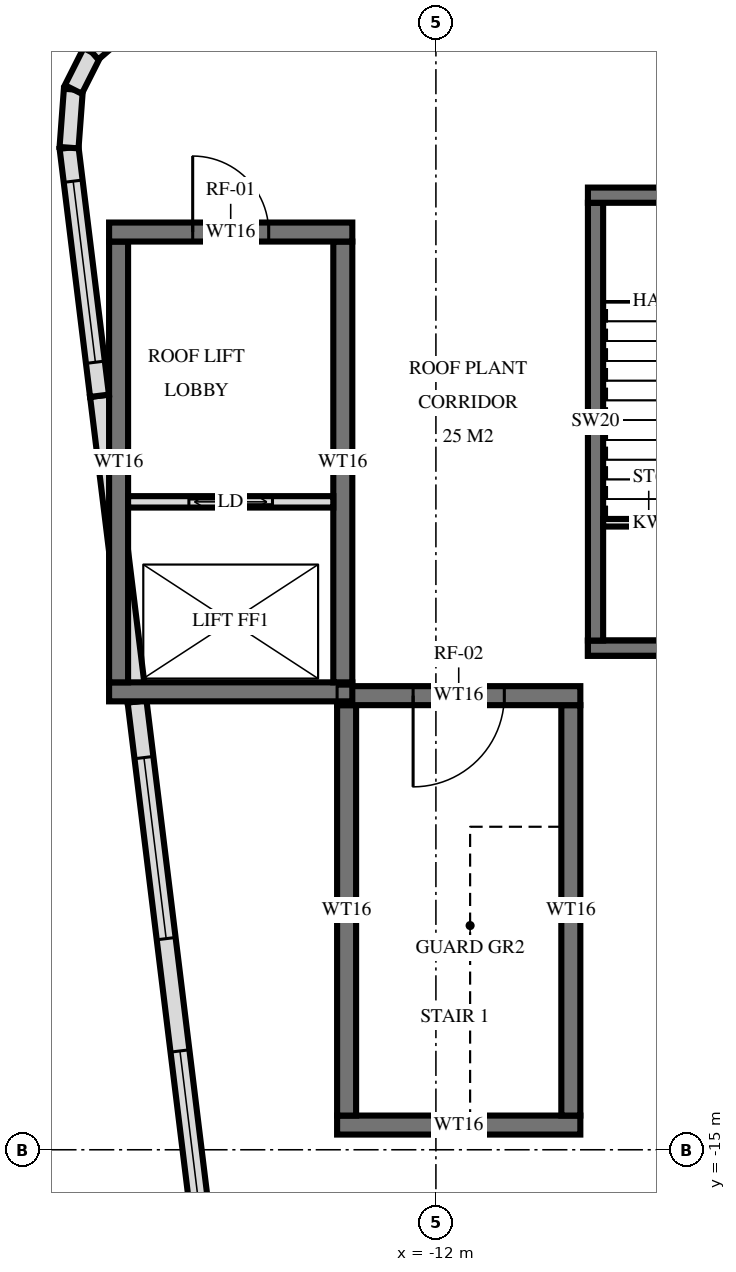
"""IFC4 building model, lengths in metres.
Left out: names, types, materials, properties, quantities, classifications, styles, units other than length and angle.
Written with IfcOpenShell. Run it as: python <this file> out.ifc"""

import sys

from ifc_helpers import new_model, si_unit, direction, frame, frame_2d, origin, place, context, subcontext, project, spatial, rectangle, extrude, element, fill, save


model = new_model("IFC4")
c1 = context("Model", 3, precision=1e-05, world=origin(), true_north=direction((0.0, 1.0)))
c2 = subcontext(c1, "Body", "Model", "MODEL_VIEW")
j1 = project(units=[si_unit("LENGTHUNIT", "METRE"), si_unit("PLANEANGLEUNIT", "RADIAN")], contexts=[c1])
p1 = place(None, origin())
s1 = spatial("IfcSite", under=j1, at=p1, CompositionType="ELEMENT")
p2 = place(p1, origin())
s2 = spatial("IfcBuilding", under=s1, at=p2, CompositionType="ELEMENT")
p3 = place(p2, frame((0.0, 0.0, 363.4)))
s3 = spatial("IfcBuildingStorey", under=s2, at=p3, CompositionType="ELEMENT", Elevation=363.4)
p4 = place(p3, frame((-13.3, -9.025, 0.0), z_axis=(0.0, 0.0, 1.0), x_axis=(1.0, 0.0, 0.0)))
e1 = element("IfcWall", 1, at=p4, inside=s3, PredefinedType="SHEAR", context=c2, shape_type="SweptSolid", body=[
    extrude(rectangle(XDim=3.2, YDim=0.25, at=frame_2d((1.6, 0.0))), origin(), (0.0, 0.0, 1.0), 3.0),
])
p5 = place(p4, frame((1.0, 0.0, 0.0)))
e2 = element("IfcOpeningElement", 2, at=p5, cuts=e1, PredefinedType="OPENING", context=c2, shape_type="SweptSolid", body=[
    extrude(rectangle(XDim=1.2, YDim=2.1, at=frame_2d((0.6, 1.05))), frame((0.0, 0.135, 0.0), z_axis=(0.0, -1.0, 0.0), x_axis=(1.0, 0.0, 0.0)), (0.0, 0.0, 1.0), 0.27),
])
p6 = place(p3, frame((-13.3, -14.675, 0.0), z_axis=(0.0, 0.0, 1.0), x_axis=(1.0, 0.0, 0.0)))
e3 = element("IfcWall", 3, at=p6, inside=s3, PredefinedType="SHEAR", context=c2, shape_type="SweptSolid", body=[
    extrude(rectangle(XDim=3.2, YDim=0.25, at=frame_2d((1.6, 0.0))), origin(), (0.0, 0.0, 1.0), 3.0),
])
for number, where, z_axis, x_axis in (
    (4, (-13.175, -14.55, 0.0), (0.0, 0.0, 1.0), (0.0, 1.0, 0.0)),
    (5, (-10.225, -14.55, 0.0), (0.0, 0.0, 1.0), (0.0, 1.0, 0.0)),
):
    element("IfcWall", number, at=place(p3, frame(where, z_axis=z_axis, x_axis=x_axis)), inside=s3, PredefinedType="SHEAR", context=c2, shape_type="SweptSolid", body=[
        extrude(rectangle(XDim=5.4, YDim=0.25, at=frame_2d((2.7, 0.0))), origin(), (0.0, 0.0, 1.0), 3.0),
    ])
p7 = place(p3, frame((-16.3, -2.925, 0.0), z_axis=(0.0, 0.0, 1.0), x_axis=(1.0, 0.0, 0.0)))
e6 = element("IfcWall", 6, at=p7, inside=s3, PredefinedType="SHEAR", context=c2, shape_type="SweptSolid", body=[
    extrude(rectangle(XDim=3.2, YDim=0.25, at=frame_2d((1.6, 0.0))), origin(), (0.0, 0.0, 1.0), 5.0),
])
p8 = place(p7, frame((1.1, 0.0, 0.0)))
e7 = element("IfcOpeningElement", 7, at=p8, cuts=e6, PredefinedType="OPENING", context=c2, shape_type="SweptSolid", body=[
    extrude(rectangle(XDim=1.0, YDim=2.1, at=frame_2d((0.5, 1.05))), frame((0.0, 0.135, 0.0), z_axis=(0.0, -1.0, 0.0), x_axis=(1.0, 0.0, 0.0)), (0.0, 0.0, 1.0), 0.27),
])
p9 = place(p3, frame((-16.3, -8.975, 0.0), z_axis=(0.0, 0.0, 1.0), x_axis=(1.0, 0.0, 0.0)))
e8 = element("IfcWall", 8, at=p9, inside=s3, PredefinedType="SHEAR", context=c2, shape_type="SweptSolid", body=[
    extrude(rectangle(XDim=3.2, YDim=0.25, at=frame_2d((1.6, 0.0))), origin(), (0.0, 0.0, 1.0), 5.0),
])
for number, where, z_axis, x_axis in (
    (9, (-16.175, -8.85, 0.0), (0.0, 0.0, 1.0), (0.0, 1.0, 0.0)),
    (10, (-13.225, -8.85, 0.0), (0.0, 0.0, 1.0), (0.0, 1.0, 0.0)),
):
    element("IfcWall", number, at=place(p3, frame(where, z_axis=z_axis, x_axis=x_axis)), inside=s3, PredefinedType="SHEAR", context=c2, shape_type="SweptSolid", body=[
        extrude(rectangle(XDim=5.8, YDim=0.25, at=frame_2d((2.9, 0.0))), origin(), (0.0, 0.0, 1.0), 5.0),
    ])
p10 = place(p3, frame((15.38, -14.767, 0.0), z_axis=(0.0, 0.0, 1.0), x_axis=(-0.992546810088, -0.121863980664, 0.0)))
e11 = element("IfcWall", 11, at=p10, inside=s3, PredefinedType="SOLIDWALL", context=c2, shape_type="SweptSolid", body=[
    extrude(rectangle(XDim=28.727, YDim=0.25, at=frame_2d((14.363, 0.0))), origin(), (0.0, 0.0, 1.0), 12.0),
])
p11 = place(p10, frame((0.396, 0.0, 1.0)))
e12 = element("IfcOpeningElement", 12, at=p11, cuts=e11, PredefinedType="OPENING", context=c2, shape_type="SweptSolid", body=[
    extrude(rectangle(XDim=2.4, YDim=9.0, at=frame_2d((1.2, 4.5))), frame((0.0, 0.135, 0.0), z_axis=(0.0, -1.0, 0.0), x_axis=(1.0, 0.0, 0.0)), (0.0, 0.0, 1.0), 0.27),
])
p12 = place(p10, frame((3.588, 0.0, 1.0)))
e13 = element("IfcOpeningElement", 13, at=p12, cuts=e11, PredefinedType="OPENING", context=c2, shape_type="SweptSolid", body=[
    extrude(rectangle(XDim=2.4, YDim=9.0, at=frame_2d((1.2, 4.5))), frame((0.0, 0.135, 0.0), z_axis=(0.0, -1.0, 0.0), x_axis=(1.0, 0.0, 0.0)), (0.0, 0.0, 1.0), 0.27),
])
p13 = place(p10, frame((6.78, 0.0, 1.0)))
e14 = element("IfcOpeningElement", 14, at=p13, cuts=e11, PredefinedType="OPENING", context=c2, shape_type="SweptSolid", body=[
    extrude(rectangle(XDim=2.4, YDim=9.0, at=frame_2d((1.2, 4.5))), frame((0.0, 0.135, 0.0), z_axis=(0.0, -1.0, 0.0), x_axis=(1.0, 0.0, 0.0)), (0.0, 0.0, 1.0), 0.27),
])
p14 = place(p10, frame((9.971, 0.0, 1.0)))
e15 = element("IfcOpeningElement", 15, at=p14, cuts=e11, PredefinedType="OPENING", context=c2, shape_type="SweptSolid", body=[
    extrude(rectangle(XDim=2.4, YDim=9.0, at=frame_2d((1.2, 4.5))), frame((0.0, 0.135, 0.0), z_axis=(0.0, -1.0, 0.0), x_axis=(1.0, 0.0, 0.0)), (0.0, 0.0, 1.0), 0.27),
])
p15 = place(p10, frame((13.163, 0.0, 1.0)))
e16 = element("IfcOpeningElement", 16, at=p15, cuts=e11, PredefinedType="OPENING", context=c2, shape_type="SweptSolid", body=[
    extrude(rectangle(XDim=2.4, YDim=9.0, at=frame_2d((1.2, 4.5))), frame((0.0, 0.135, 0.0), z_axis=(0.0, -1.0, 0.0), x_axis=(1.0, 0.0, 0.0)), (0.0, 0.0, 1.0), 0.27),
])
p16 = place(p10, frame((16.355, 0.0, 1.0)))
e17 = element("IfcOpeningElement", 17, at=p16, cuts=e11, PredefinedType="OPENING", context=c2, shape_type="SweptSolid", body=[
    extrude(rectangle(XDim=2.4, YDim=9.0, at=frame_2d((1.2, 4.5))), frame((0.0, 0.135, 0.0), z_axis=(0.0, -1.0, 0.0), x_axis=(1.0, 0.0, 0.0)), (0.0, 0.0, 1.0), 0.27),
])
p17 = place(p10, frame((19.547, 0.0, 1.0)))
e18 = element("IfcOpeningElement", 18, at=p17, cuts=e11, PredefinedType="OPENING", context=c2, shape_type="SweptSolid", body=[
    extrude(rectangle(XDim=2.4, YDim=9.0, at=frame_2d((1.2, 4.5))), frame((0.0, 0.135, 0.0), z_axis=(0.0, -1.0, 0.0), x_axis=(1.0, 0.0, 0.0)), (0.0, 0.0, 1.0), 0.27),
])
p18 = place(p10, frame((22.739, 0.0, 1.0)))
e19 = element("IfcOpeningElement", 19, at=p18, cuts=e11, PredefinedType="OPENING", context=c2, shape_type="SweptSolid", body=[
    extrude(rectangle(XDim=2.4, YDim=9.0, at=frame_2d((1.2, 4.5))), frame((0.0, 0.135, 0.0), z_axis=(0.0, -1.0, 0.0), x_axis=(1.0, 0.0, 0.0)), (0.0, 0.0, 1.0), 0.27),
])
p19 = place(p10, frame((25.931, 0.0, 1.0)))
e20 = element("IfcOpeningElement", 20, at=p19, cuts=e11, PredefinedType="OPENING", context=c2, shape_type="SweptSolid", body=[
    extrude(rectangle(XDim=2.4, YDim=9.0, at=frame_2d((1.2, 4.5))), frame((0.0, 0.135, 0.0), z_axis=(0.0, -1.0, 0.0), x_axis=(1.0, 0.0, 0.0)), (0.0, 0.0, 1.0), 0.27),
])
p20 = place(p3, frame((-14.984, -16.821, 0.0), z_axis=(0.0, 0.0, 1.0), x_axis=(-0.121855495288, 0.992547851878, 0.0)))
e21 = element("IfcWall", 21, at=p20, inside=s3, PredefinedType="SOLIDWALL", context=c2, shape_type="SweptSolid", body=[
    extrude(rectangle(XDim=7.778, YDim=0.25, at=frame_2d((3.889, 0.0))), origin(), (0.0, 0.0, 1.0), 12.0),
])
p21 = place(p20, frame((0.744, 0.0, 1.0)))
e22 = element("IfcOpeningElement", 22, at=p21, cuts=e21, PredefinedType="OPENING", context=c2, shape_type="SweptSolid", body=[
    extrude(rectangle(XDim=2.4, YDim=9.0, at=frame_2d((1.2, 4.5))), frame((0.0, 0.135, 0.0), z_axis=(0.0, -1.0, 0.0), x_axis=(1.0, 0.0, 0.0)), (0.0, 0.0, 1.0), 0.27),
])
p22 = place(p20, frame((4.633, 0.0, 1.0)))
e23 = element("IfcOpeningElement", 23, at=p22, cuts=e21, PredefinedType="OPENING", context=c2, shape_type="SweptSolid", body=[
    extrude(rectangle(XDim=2.4, YDim=9.0, at=frame_2d((1.2, 4.5))), frame((0.0, 0.135, 0.0), z_axis=(0.0, -1.0, 0.0), x_axis=(1.0, 0.0, 0.0)), (0.0, 0.0, 1.0), 0.27),
])
p23 = place(p3, frame((-16.426, -5.079, 0.0), z_axis=(0.0, 0.0, 1.0), x_axis=(-0.121896433705, 0.992542824995, 0.0)))
e24 = element("IfcWall", 24, at=p23, inside=s3, PredefinedType="SOLIDWALL", context=c2, shape_type="SweptSolid", body=[
    extrude(rectangle(XDim=3.289, YDim=0.25, at=frame_2d((1.644, 0.0))), origin(), (0.0, 0.0, 1.0), 12.0),
])
p24 = place(p23, frame((0.444, 0.0, 1.0)))
e25 = element("IfcOpeningElement", 25, at=p24, cuts=e24, PredefinedType="OPENING", context=c2, shape_type="SweptSolid", body=[
    extrude(rectangle(XDim=2.4, YDim=9.0, at=frame_2d((1.2, 4.5))), frame((0.0, 0.135, 0.0), z_axis=(0.0, -1.0, 0.0), x_axis=(1.0, 0.0, 0.0)), (0.0, 0.0, 1.0), 0.27),
])
p25 = place(p3, frame((-16.827, -1.815, 0.0), z_axis=(0.0, 0.0, 1.0), x_axis=(0.074070751166, 0.997252988876, 0.0)))
e26 = element("IfcWall", 26, at=p25, inside=s3, PredefinedType="SOLIDWALL", context=c2, shape_type="SweptSolid", body=[
    extrude(rectangle(XDim=0.768, YDim=0.25, at=frame_2d((0.384, 0.0))), origin(), (0.0, 0.0, 1.0), 12.0),
])
p26 = place(p3, frame((-16.77, -1.049, 0.0), z_axis=(0.0, 0.0, 1.0), x_axis=(0.450424839649, 0.892814350146, 0.0)))
e27 = element("IfcWall", 27, at=p26, inside=s3, PredefinedType="SOLIDWALL", context=c2, shape_type="SweptSolid", body=[
    extrude(rectangle(XDim=0.547, YDim=0.25, at=frame_2d((0.273, 0.0))), origin(), (0.0, 0.0, 1.0), 12.0),
])
p27 = place(p3, frame((-16.524, -0.561, 0.0), z_axis=(0.0, 0.0, 1.0), x_axis=(0.757394739228, 0.652957279605, 0.0)))
e28 = element("IfcWall", 28, at=p27, inside=s3, PredefinedType="SOLIDWALL", context=c2, shape_type="SweptSolid", body=[
    extrude(rectangle(XDim=0.547, YDim=0.25, at=frame_2d((0.273, 0.0))), origin(), (0.0, 0.0, 1.0), 12.0),
])
p28 = place(p3, frame((-15.932, -9.101, 5.25), z_axis=(0.0, 0.0, 1.0), x_axis=(-0.121884012435, 0.992544350401, 0.0)))
e29 = element("IfcWall", 29, at=p28, inside=s3, PredefinedType="SOLIDWALL", context=c2, shape_type="SweptSolid", body=[
    extrude(rectangle(XDim=4.052, YDim=0.25, at=frame_2d((2.026, 0.0))), origin(), (0.0, 0.0, 1.0), 6.75),
])
p29 = place(p3, frame((-17.019, -17.277, 0.0), z_axis=(0.0, 0.0, 1.0), x_axis=(-0.12187092039, 0.992545958011, 0.0)))
e30 = element("IfcWall", 30, at=p29, inside=s3, PredefinedType="PARAPET", context=c2, shape_type="SweptSolid", body=[
    extrude(rectangle(XDim=15.527, YDim=0.25, at=frame_2d((7.764, 0.0))), origin(), (0.0, 0.0, 1.0), 1.1),
])
p30 = place(p3, frame((-16.05, -6.475, 0.0), z_axis=(0.0, 0.0, 1.0), x_axis=(1.0, 0.0, 0.0)))
e31 = element("IfcWall", 31, at=p30, inside=s3, PredefinedType="PARTITIONING", context=c2, shape_type="SweptSolid", body=[
    extrude(rectangle(XDim=2.7, YDim=0.15, at=frame_2d((1.35, 0.0))), origin(), (0.0, 0.0, 1.0), 5.0),
])
p31 = place(p30, frame((0.8, 0.0, 0.0)))
e32 = element("IfcOpeningElement", 32, at=p31, cuts=e31, PredefinedType="OPENING", context=c2, shape_type="SweptSolid", body=[
    extrude(rectangle(XDim=1.1, YDim=2.1, at=frame_2d((0.55, 1.05))), frame((0.0, 0.085, 0.0), z_axis=(0.0, -1.0, 0.0), x_axis=(1.0, 0.0, 0.0)), (0.0, 0.0, 1.0), 0.17),
])
p32 = place(p3, frame((-9.9, -8.3, 0.0), z_axis=(0.0, 0.0, 1.0), x_axis=(0.0, 1.0, 0.0)))
e33 = element("IfcWall", 33, at=p32, inside=s3, PredefinedType="SHEAR", context=c2, shape_type="SweptSolid", body=[
    extrude(rectangle(XDim=5.76, YDim=0.2, at=frame_2d((2.88, 0.0))), origin(), (0.0, 0.0, 1.0), 14.9),
])
p33 = place(p3, frame((-10.0, -2.44, 0.0), z_axis=(0.0, 0.0, 1.0), x_axis=(1.0, 0.0, 0.0)))
e34 = element("IfcWall", 34, at=p33, inside=s3, PredefinedType="SHEAR", context=c2, shape_type="SweptSolid", body=[
    extrude(rectangle(XDim=3.05, YDim=0.2, at=frame_2d((1.525, 0.0))), origin(), (0.0, 0.0, 1.0), 14.9),
])
p34 = place(p3, frame((-10.0, -8.4, 0.0), z_axis=(0.0, 0.0, 1.0), x_axis=(1.0, 0.0, 0.0)))
e35 = element("IfcWall", 35, at=p34, inside=s3, PredefinedType="SHEAR", context=c2, shape_type="SweptSolid", body=[
    extrude(rectangle(XDim=3.05, YDim=0.2, at=frame_2d((1.525, 0.0))), origin(), (0.0, 0.0, 1.0), 12.2),
])
p35 = place(p34, frame((0.925, 0.0, 0.0)))
e36 = element("IfcOpeningElement", 36, at=p35, cuts=e35, PredefinedType="OPENING", context=c2, shape_type="SweptSolid", body=[
    extrude(rectangle(XDim=1.2, YDim=2.1, at=frame_2d((0.6, 1.05))), frame((0.0, 0.11, 0.0), z_axis=(0.0, -1.0, 0.0), x_axis=(1.0, 0.0, 0.0)), (0.0, 0.0, 1.0), 0.22),
])
p36 = place(p3, frame((-10.0, -8.4, 12.2), z_axis=(0.0, 0.0, 1.0), x_axis=(1.0, 0.0, 0.0)))
e37 = element("IfcWall", 37, at=p36, inside=s3, PredefinedType="SHEAR", context=c2, shape_type="SweptSolid", body=[
    extrude(rectangle(XDim=3.05, YDim=0.2, at=frame_2d((1.525, 0.0))), origin(), (0.0, 0.0, 1.0), 2.7),
])
p37 = place(p36, frame((0.925, 0.0, 0.0)))
e38 = element("IfcOpeningElement", 38, at=p37, cuts=e37, PredefinedType="OPENING", context=c2, shape_type="SweptSolid", body=[
    extrude(rectangle(XDim=1.2, YDim=2.1, at=frame_2d((0.6, 1.05))), frame((0.0, 0.11, 0.0), z_axis=(0.0, -1.0, 0.0), x_axis=(1.0, 0.0, 0.0)), (0.0, 0.0, 1.0), 0.22),
])
p38 = place(p3, frame((-9.8, -6.75, 12.2), z_axis=(0.0, 0.0, 1.0), x_axis=(1.0, 0.0, 0.0)))
e39 = element("IfcWall", 39, at=p38, inside=s3, PredefinedType="PARAPET", context=c2, shape_type="SweptSolid", body=[
    extrude(rectangle(XDim=1.45, YDim=0.1, at=frame_2d((0.725, 0.0))), origin(), (0.0, 0.0, 1.0), 1.1),
])
p39 = place(p21, origin())
e40 = element("IfcWindow", 40, at=p39, inside=s3, PartitioningType="SINGLE_PANEL", PredefinedType="USERDEFINED", context=c2, shape_type="SweptSolid", body=[
    extrude(rectangle(XDim=2.4, YDim=9.0, at=frame_2d((1.2, 4.5))), frame((0.0, 0.03, 0.0), z_axis=(0.0, -1.0, 0.0), x_axis=(1.0, 0.0, 0.0)), (0.0, 0.0, 1.0), 0.06),
])
fill(e22, e40)
p40 = place(p22, origin())
e41 = element("IfcWindow", 41, at=p40, inside=s3, PartitioningType="SINGLE_PANEL", PredefinedType="USERDEFINED", context=c2, shape_type="SweptSolid", body=[
    extrude(rectangle(XDim=2.4, YDim=9.0, at=frame_2d((1.2, 4.5))), frame((0.0, 0.03, 0.0), z_axis=(0.0, -1.0, 0.0), x_axis=(1.0, 0.0, 0.0)), (0.0, 0.0, 1.0), 0.06),
])
fill(e23, e41)
p41 = place(p24, origin())
e42 = element("IfcWindow", 42, at=p41, inside=s3, PartitioningType="SINGLE_PANEL", PredefinedType="USERDEFINED", context=c2, shape_type="SweptSolid", body=[
    extrude(rectangle(XDim=2.4, YDim=9.0, at=frame_2d((1.2, 4.5))), frame((0.0, 0.03, 0.0), z_axis=(0.0, -1.0, 0.0), x_axis=(1.0, 0.0, 0.0)), (0.0, 0.0, 1.0), 0.06),
])
fill(e25, e42)
p42 = place(p31, origin())
e43 = element("IfcDoor", 43, at=p42, inside=s3, OperationType="DOUBLE_DOOR_SLIDING", PredefinedType="USERDEFINED", context=c2, shape_type="SweptSolid", body=[
    extrude(rectangle(XDim=1.1, YDim=2.1, at=frame_2d((0.55, 1.05))), frame((0.0, 0.025, 0.0), z_axis=(0.0, -1.0, 0.0), x_axis=(1.0, 0.0, 0.0)), (0.0, 0.0, 1.0), 0.05),
])
fill(e32, e43)
p43 = place(p8, origin())
e44 = element("IfcDoor", 44, at=p43, inside=s3, OperationType="SINGLE_SWING_RIGHT", PredefinedType="DOOR", context=c2, shape_type="SweptSolid", body=[
    extrude(rectangle(XDim=1.0, YDim=2.1, at=frame_2d((0.5, 1.05))), frame((0.0, 0.025, 0.0), z_axis=(0.0, -1.0, 0.0), x_axis=(1.0, 0.0, 0.0)), (0.0, 0.0, 1.0), 0.05),
])
fill(e7, e44)
p44 = place(p5, frame((0.6, 0.0, 0.0), z_axis=(0.0, 0.0, 1.0), x_axis=(-1.0, 0.0, 0.0)))
e45 = element("IfcDoor", 45, at=p44, inside=s3, OperationType="SINGLE_SWING_LEFT", PredefinedType="DOOR", context=c2, shape_type="SweptSolid", body=[
    extrude(rectangle(XDim=1.2, YDim=2.1, at=frame_2d((0.0, 1.05))), frame((0.0, -0.025, 0.0), z_axis=(0.0, 1.0, 0.0), x_axis=(-1.0, 0.0, 0.0)), (0.0, 0.0, 1.0), 0.05),
])
fill(e2, e45)
save(model, sys.argv[1])
